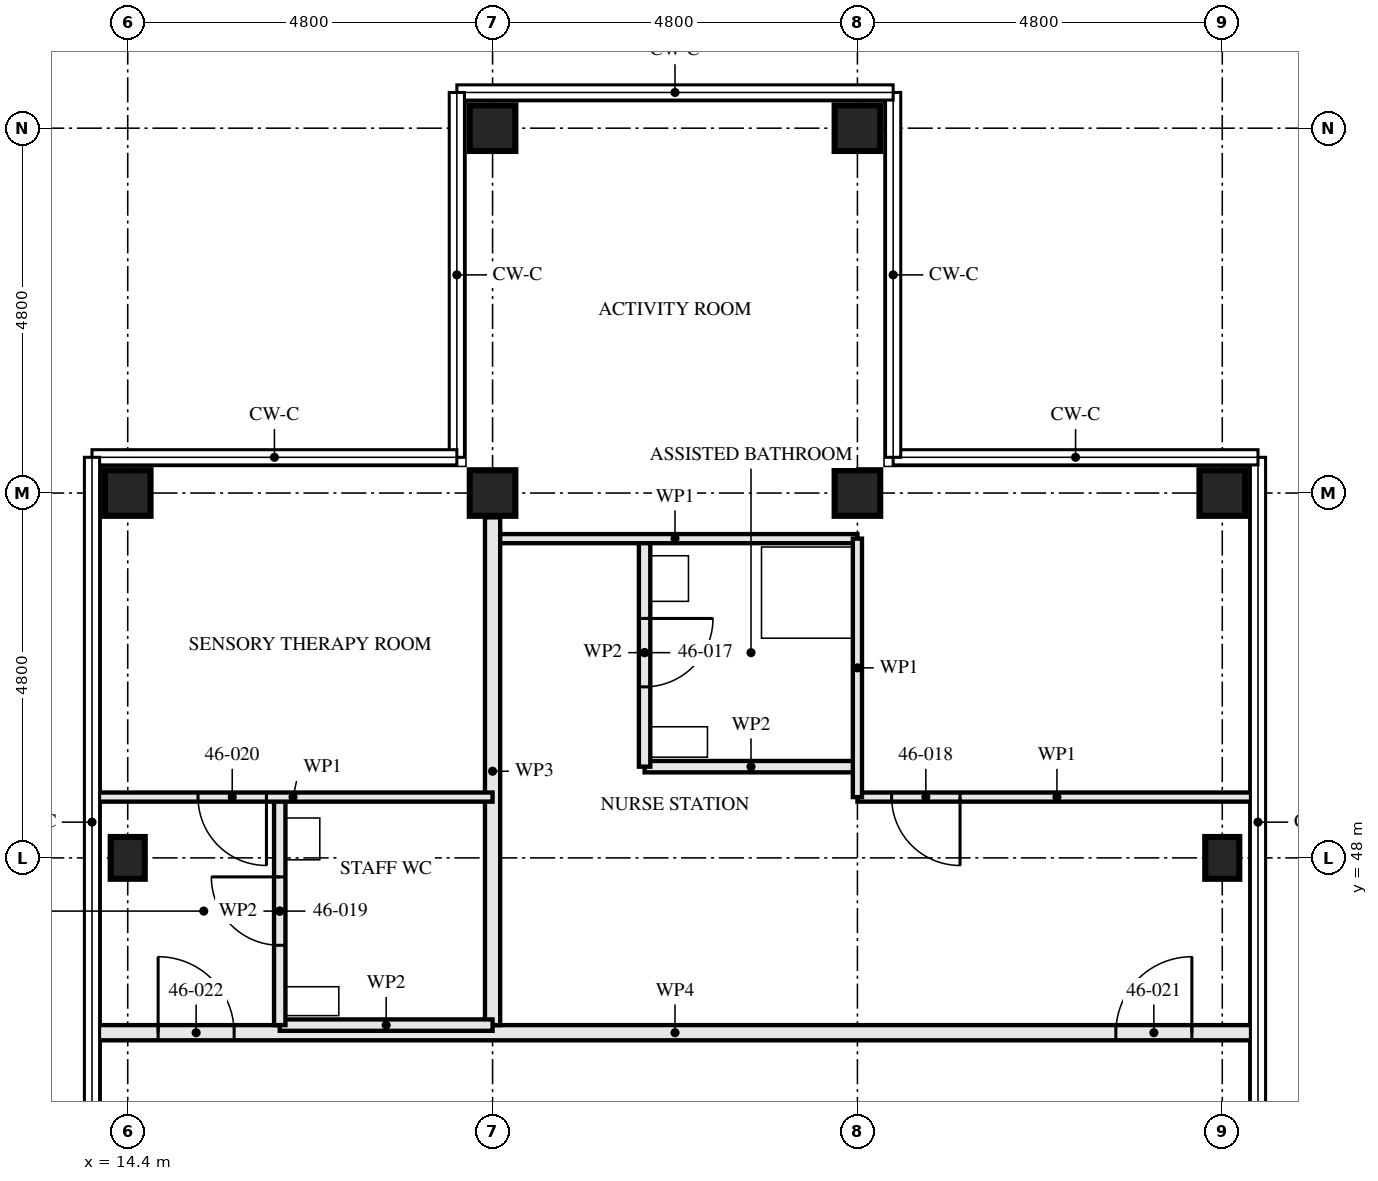
"""IFC4 building model, lengths in metres.
Left out: names, types, materials, properties, quantities, classifications, styles, units other than length and angle.
Written with IfcOpenShell. Run it as: python <this file> out.ifc"""

import sys

from ifc_helpers import new_model, si_unit, direction, frame, frame_2d, origin, origin_2d, place, context, subcontext, project, spatial, rectangle, hollow_rectangle, i_section, extrude, element, fill, save


model = new_model("IFC4")
c1 = context("Model", 3, precision=1e-05, world=origin(), true_north=direction((0.0, 1.0)))
c2 = subcontext(c1, "Body", "Model", "MODEL_VIEW")
j1 = project(units=[si_unit("LENGTHUNIT", "METRE"), si_unit("PLANEANGLEUNIT", "RADIAN")], contexts=[c1])
p1 = place(None, origin())
s1 = spatial("IfcSite", under=j1, at=p1, CompositionType="ELEMENT")
p2 = place(p1, origin())
s2 = spatial("IfcBuilding", under=s1, at=p2, CompositionType="ELEMENT")
p3 = place(p2, frame((0.0, 0.0, 169.0)))
s3 = spatial("IfcBuildingStorey", under=s2, at=p3, CompositionType="ELEMENT", Elevation=169.0)
p4 = place(p3, frame((14.4, 48.0, 0.0), z_axis=(0.0, 0.0, 1.0), x_axis=(1.0, 0.0, 0.0)))
e1 = element("IfcColumn", 1, at=p4, inside=s3, PredefinedType="COLUMN", context=c2, shape_type="SweptSolid", body=[
    extrude(i_section(OverallWidth=0.448, OverallDepth=0.55, WebThickness=0.072, FlangeThickness=0.115, FilletRadius=0.015, at=origin_2d()), origin(), (0.0, 0.0, 1.0), 3.5),
])
for number, where, z_axis, x_axis in (
    (2, (14.4, 52.8, 0.0), (0.0, 0.0, 1.0), (0.0, 1.0, 0.0)),
    (3, (19.2, 52.8, 0.0), (0.0, 0.0, 1.0), (0.0, 1.0, 0.0)),
    (4, (19.2, 57.6, 0.0), (0.0, 0.0, 1.0), (0.0, 1.0, 0.0)),
    (5, (24.0, 52.8, 0.0), (0.0, 0.0, 1.0), (0.0, 1.0, 0.0)),
    (6, (24.0, 57.6, 0.0), (0.0, 0.0, 1.0), (0.0, 1.0, 0.0)),
):
    element("IfcColumn", number, at=place(p3, frame(where, z_axis=z_axis, x_axis=x_axis)), inside=s3, PredefinedType="COLUMN", context=c2, shape_type="SweptSolid", body=[
        extrude(hollow_rectangle(XDim=0.6, YDim=0.6, WallThickness=0.05, at=origin_2d()), origin(), (0.0, 0.0, 1.0), 3.5),
    ])
p5 = place(p3, frame((28.8, 48.0, 0.0), z_axis=(0.0, 0.0, 1.0), x_axis=(1.0, 0.0, 0.0)))
e7 = element("IfcColumn", 7, at=p5, inside=s3, PredefinedType="COLUMN", context=c2, shape_type="SweptSolid", body=[
    extrude(i_section(OverallWidth=0.448, OverallDepth=0.55, WebThickness=0.072, FlangeThickness=0.115, FilletRadius=0.015, at=origin_2d()), origin(), (0.0, 0.0, 1.0), 3.5),
])
p6 = place(p3, frame((28.8, 52.8, 0.0), z_axis=(0.0, 0.0, 1.0), x_axis=(0.0, 1.0, 0.0)))
e8 = element("IfcColumn", 8, at=p6, inside=s3, PredefinedType="COLUMN", context=c2, shape_type="SweptSolid", body=[
    extrude(hollow_rectangle(XDim=0.6, YDim=0.6, WallThickness=0.05, at=origin_2d()), origin(), (0.0, 0.0, 1.0), 3.5),
])
p7 = place(p3, frame((21.2, 52.2, 0.0), z_axis=(0.0, 0.0, 1.0), x_axis=(0.0, -1.0, 0.0)))
e9 = element("IfcWall", 9, at=p7, inside=s3, PredefinedType="PARTITIONING", context=c2, shape_type="SweptSolid", body=[
    extrude(rectangle(XDim=3.0, YDim=0.15, at=frame_2d((1.5, 0.0))), origin(), (0.0, 0.0, 1.0), 3.33),
])
p8 = place(p7, frame((1.05, 0.0, 0.0)))
e10 = element("IfcOpeningElement", 10, at=p8, cuts=e9, PredefinedType="OPENING", context=c2, shape_type="SweptSolid", body=[
    extrude(rectangle(XDim=0.9, YDim=2.1, at=frame_2d((0.45, 1.05))), frame((0.0, 0.085, 0.0), z_axis=(0.0, -1.0, 0.0), x_axis=(1.0, 0.0, 0.0)), (0.0, 0.0, 1.0), 0.171),
])
p9 = place(p3, frame((24.0, 49.2, 0.0), z_axis=(0.0, 0.0, 1.0), x_axis=(-1.0, 0.0, 0.0)))
e11 = element("IfcWall", 11, at=p9, inside=s3, PredefinedType="PARTITIONING", context=c2, shape_type="SweptSolid", body=[
    extrude(rectangle(XDim=2.8, YDim=0.15, at=frame_2d((1.4, 0.0))), origin(), (0.0, 0.0, 1.0), 3.33),
])
p10 = place(p3, frame((29.25, 48.8, 0.0), z_axis=(0.0, 0.0, 1.0), x_axis=(-1.0, 0.0, 0.0)))
e12 = element("IfcWall", 12, at=p10, inside=s3, PredefinedType="PARTITIONING", context=c2, shape_type="SweptSolid", body=[
    extrude(rectangle(XDim=5.25, YDim=0.12, at=frame_2d((2.625, 0.0))), origin(), (0.0, 0.0, 1.0), 2.32),
])
p11 = place(p10, frame((3.9, 0.0, 0.0)))
e13 = element("IfcOpeningElement", 13, at=p11, cuts=e12, PredefinedType="OPENING", context=c2, shape_type="SweptSolid", body=[
    extrude(rectangle(XDim=0.9, YDim=2.1, at=frame_2d((0.45, 1.05))), frame((0.0, 0.071, 0.0), z_axis=(0.0, -1.0, 0.0), x_axis=(1.0, 0.0, 0.0)), (0.0, 0.0, 1.0), 0.141),
])
p12 = place(p3, frame((24.0, 52.2, 0.0), z_axis=(0.0, 0.0, 1.0), x_axis=(-1.0, 0.0, 0.0)))
e14 = element("IfcWall", 14, at=p12, inside=s3, PredefinedType="PARTITIONING", context=c2, shape_type="SweptSolid", body=[
    extrude(rectangle(XDim=4.8, YDim=0.12, at=frame_2d((2.4, 0.0))), origin(), (0.0, 0.0, 1.0), 3.33),
])
p13 = place(p3, frame((24.0, 52.2, 0.0), z_axis=(0.0, 0.0, 1.0), x_axis=(0.0, -1.0, 0.0)))
e15 = element("IfcWall", 15, at=p13, inside=s3, PredefinedType="PARTITIONING", context=c2, shape_type="SweptSolid", body=[
    extrude(rectangle(XDim=3.4, YDim=0.12, at=frame_2d((1.7, 0.0))), origin(), (0.0, 0.0, 1.0), 3.33),
])
p14 = place(p3, frame((19.2, 52.48, 0.0), z_axis=(0.0, 0.0, 1.0), x_axis=(0.0, -1.0, 0.0)))
e16 = element("IfcWall", 16, at=p14, inside=s3, PredefinedType="PARTITIONING", context=c2, shape_type="SweptSolid", body=[
    extrude(rectangle(XDim=6.68, YDim=0.2, at=frame_2d((3.34, 0.0))), origin(), (0.0, 0.0, 1.0), 2.55),
])
p15 = place(p3, frame((16.4, 48.8, 0.0), z_axis=(0.0, 0.0, 1.0), x_axis=(0.0, -1.0, 0.0)))
e17 = element("IfcWall", 17, at=p15, inside=s3, PredefinedType="PARTITIONING", context=c2, shape_type="SweptSolid", body=[
    extrude(rectangle(XDim=3.0, YDim=0.15, at=frame_2d((1.5, 0.0))), origin(), (0.0, 0.0, 1.0), 2.55),
])
p16 = place(p15, frame((1.05, 0.0, 0.0)))
e18 = element("IfcOpeningElement", 18, at=p16, cuts=e17, PredefinedType="OPENING", context=c2, shape_type="SweptSolid", body=[
    extrude(rectangle(XDim=0.9, YDim=2.1, at=frame_2d((0.45, 1.05))), frame((0.0, 0.085, 0.0), z_axis=(0.0, -1.0, 0.0), x_axis=(1.0, 0.0, 0.0)), (0.0, 0.0, 1.0), 0.171),
])
p17 = place(p3, frame((19.2, 45.8, 0.0), z_axis=(0.0, 0.0, 1.0), x_axis=(-1.0, 0.0, 0.0)))
e19 = element("IfcWall", 19, at=p17, inside=s3, PredefinedType="PARTITIONING", context=c2, shape_type="SweptSolid", body=[
    extrude(rectangle(XDim=2.8, YDim=0.15, at=frame_2d((1.4, 0.0))), origin(), (0.0, 0.0, 1.0), 3.33),
])
p18 = place(p3, frame((19.2, 48.8, 0.0), z_axis=(0.0, 0.0, 1.0), x_axis=(-1.0, 0.0, 0.0)))
e20 = element("IfcWall", 20, at=p18, inside=s3, PredefinedType="PARTITIONING", context=c2, shape_type="SweptSolid", body=[
    extrude(rectangle(XDim=5.25, YDim=0.12, at=frame_2d((2.625, 0.0))), origin(), (0.0, 0.0, 1.0), 2.32),
])
p19 = place(p18, frame((2.975, 0.0, 0.0)))
e21 = element("IfcOpeningElement", 21, at=p19, cuts=e20, PredefinedType="OPENING", context=c2, shape_type="SweptSolid", body=[
    extrude(rectangle(XDim=0.9, YDim=2.1, at=frame_2d((0.45, 1.05))), frame((0.0, 0.071, 0.0), z_axis=(0.0, -1.0, 0.0), x_axis=(1.0, 0.0, 0.0)), (0.0, 0.0, 1.0), 0.141),
])
p20 = place(p3, frame((29.25, 45.7, 0.0), z_axis=(0.0, 0.0, 1.0), x_axis=(-1.0, 0.0, 0.0)))
e22 = element("IfcWall", 22, at=p20, inside=s3, PredefinedType="PARTITIONING", context=c2, shape_type="SweptSolid", body=[
    extrude(rectangle(XDim=15.3, YDim=0.2, at=frame_2d((7.65, 0.0))), origin(), (0.0, 0.0, 1.0), 2.32),
])
p21 = place(p20, frame((0.85, 0.0, 0.0)))
e23 = element("IfcOpeningElement", 23, at=p21, cuts=e22, PredefinedType="OPENING", context=c2, shape_type="SweptSolid", body=[
    extrude(rectangle(XDim=1.0, YDim=2.1, at=frame_2d((0.5, 1.05))), frame((0.0, 0.111, 0.0), z_axis=(0.0, -1.0, 0.0), x_axis=(1.0, 0.0, 0.0)), (0.0, 0.0, 1.0), 0.221),
])
p22 = place(p20, frame((13.45, 0.0, 0.0)))
e24 = element("IfcOpeningElement", 24, at=p22, cuts=e22, PredefinedType="OPENING", context=c2, shape_type="SweptSolid", body=[
    extrude(rectangle(XDim=1.0, YDim=2.1, at=frame_2d((0.5, 1.05))), frame((0.0, 0.111, 0.0), z_axis=(0.0, -1.0, 0.0), x_axis=(1.0, 0.0, 0.0)), (0.0, 0.0, 1.0), 0.221),
])
p23 = place(p8, origin())
e25 = element("IfcDoor", 25, at=p23, inside=s3, OperationType="SINGLE_SWING_RIGHT", PredefinedType="DOOR", context=c2, shape_type="SweptSolid", body=[
    extrude(rectangle(XDim=0.9, YDim=2.1, at=frame_2d((0.45, 1.05))), frame((0.0, 0.022, 0.0), z_axis=(0.0, -1.0, 0.0), x_axis=(1.0, 0.0, 0.0)), (0.0, 0.0, 1.0), 0.044),
])
fill(e10, e25)
p24 = place(p11, origin())
e26 = element("IfcDoor", 26, at=p24, inside=s3, OperationType="SINGLE_SWING_RIGHT", PredefinedType="DOOR", context=c2, shape_type="SweptSolid", body=[
    extrude(rectangle(XDim=0.9, YDim=2.1, at=frame_2d((0.45, 1.05))), frame((0.0, 0.022, 0.0), z_axis=(0.0, -1.0, 0.0), x_axis=(1.0, 0.0, 0.0)), (0.0, 0.0, 1.0), 0.044),
])
fill(e13, e26)
p25 = place(p16, frame((0.9, 0.0, 0.0), z_axis=(0.0, 0.0, 1.0), x_axis=(-1.0, 0.0, 0.0)))
e27 = element("IfcDoor", 27, at=p25, inside=s3, OperationType="SINGLE_SWING_LEFT", PredefinedType="DOOR", context=c2, shape_type="SweptSolid", body=[
    extrude(rectangle(XDim=0.9, YDim=2.1, at=frame_2d((0.45, 1.05))), frame((0.0, 0.022, 0.0), z_axis=(0.0, -1.0, 0.0), x_axis=(1.0, 0.0, 0.0)), (0.0, 0.0, 1.0), 0.044),
])
fill(e18, e27)
p26 = place(p19, origin())
e28 = element("IfcDoor", 28, at=p26, inside=s3, OperationType="SINGLE_SWING_RIGHT", PredefinedType="DOOR", context=c2, shape_type="SweptSolid", body=[
    extrude(rectangle(XDim=0.9, YDim=2.1, at=frame_2d((0.45, 1.05))), frame((0.0, 0.022, 0.0), z_axis=(0.0, -1.0, 0.0), x_axis=(1.0, 0.0, 0.0)), (0.0, 0.0, 1.0), 0.044),
])
fill(e21, e28)
p27 = place(p21, frame((1.0, 0.0, 0.0), z_axis=(0.0, 0.0, 1.0), x_axis=(-1.0, 0.0, 0.0)))
e29 = element("IfcDoor", 29, at=p27, inside=s3, OperationType="SINGLE_SWING_LEFT", PredefinedType="DOOR", context=c2, shape_type="SweptSolid", body=[
    extrude(rectangle(XDim=1.0, YDim=2.1, at=frame_2d((0.5, 1.05))), frame((0.0, 0.027, 0.0), z_axis=(0.0, -1.0, 0.0), x_axis=(1.0, 0.0, 0.0)), (0.0, 0.0, 1.0), 0.054),
])
fill(e23, e29)
p28 = place(p22, frame((1.0, 0.0, 0.0), z_axis=(0.0, 0.0, 1.0), x_axis=(-1.0, 0.0, 0.0)))
e30 = element("IfcDoor", 30, at=p28, inside=s3, OperationType="SINGLE_SWING_RIGHT", PredefinedType="DOOR", context=c2, shape_type="SweptSolid", body=[
    extrude(rectangle(XDim=1.0, YDim=2.1, at=frame_2d((0.5, 1.05))), frame((0.0, 0.027, 0.0), z_axis=(0.0, -1.0, 0.0), x_axis=(1.0, 0.0, 0.0)), (0.0, 0.0, 1.0), 0.054),
])
fill(e24, e30)
save(model, sys.argv[1])
